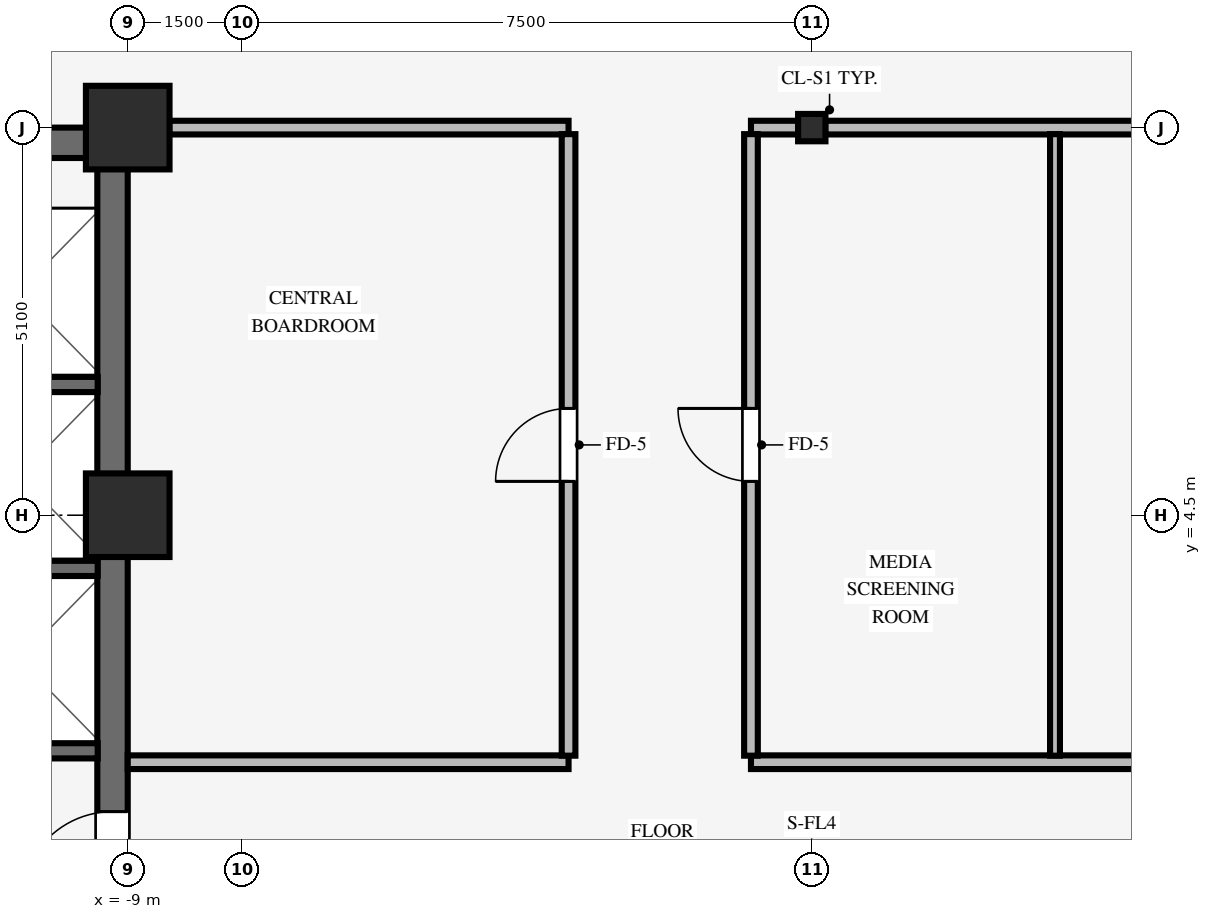
"""IFC4 building model, lengths in metres.
Left out: names, types, materials, properties, quantities, classifications, styles, units other than length and angle.
Written with IfcOpenShell. Run it as: python <this file> out.ifc"""

import sys

from ifc_helpers import new_model, si_unit, direction, frame, frame_2d, origin, origin_2d, place, context, subcontext, project, spatial, rectangle, i_section, extrude, source, transform, mapped, element, fill, save


model = new_model("IFC4")
c1 = context("Model", 3, precision=1e-05, world=origin(), true_north=direction((0.0, 1.0)))
c2 = subcontext(c1, "Body", "Model", "MODEL_VIEW")
j1 = project(units=[si_unit("LENGTHUNIT", "METRE"), si_unit("PLANEANGLEUNIT", "RADIAN")], contexts=[c1])
p1 = place(None, origin())
s1 = spatial("IfcSite", under=j1, at=p1, CompositionType="ELEMENT")
p2 = place(p1, origin())
s2 = spatial("IfcBuilding", under=s1, at=p2, CompositionType="ELEMENT")
p3 = place(p2, frame((0.0, 0.0, 112.9)))
s3 = spatial("IfcBuildingStorey", under=s2, at=p3, CompositionType="ELEMENT", Elevation=112.9)
p4 = place(p3, frame((-17.5, 9.4, 0.0), z_axis=(0.0, 0.0, 1.0), x_axis=(1.0, 0.0, 0.0)))
e1 = element("IfcWall", 1, at=p4, inside=s3, PredefinedType="SHEAR", context=c2, shape_type="SweptSolid", body=[
    extrude(rectangle(XDim=8.5, YDim=0.4, at=frame_2d((4.25, 0.0))), origin(), (0.0, 0.0, 1.0), 3.25),
])
p5 = place(p3, frame((-9.2, -9.205, 0.0), z_axis=(0.0, 0.0, 1.0), x_axis=(0.0, 1.0, 0.0)))
e2 = element("IfcWall", 2, at=p5, inside=s3, PredefinedType="SHEAR", context=c2, shape_type="SweptSolid", body=[
    extrude(rectangle(XDim=18.41, YDim=0.4, at=frame_2d((9.205, 0.0))), origin(), (0.0, 0.0, 1.0), 3.25),
])
p6 = place(p5, frame((8.605, 0.0, 0.0)))
e3 = element("IfcOpeningElement", 3, at=p6, cuts=e2, PredefinedType="OPENING", context=c2, shape_type="SweptSolid", body=[
    extrude(rectangle(XDim=1.2, YDim=2.15, at=frame_2d((0.6, 1.075))), frame((0.0, 0.21, 0.0), z_axis=(0.0, -1.0, 0.0), x_axis=(1.0, 0.0, 0.0)), (0.0, 0.0, 1.0), 0.42),
])
for number, where, z_axis, x_axis in (
    (4, (-9.0, 4.5, 0.0), (0.0, 0.0, 1.0), (1.0, 0.0, 0.0)),
    (5, (-9.0, 9.6, 0.0), (0.0, 0.0, 1.0), (1.0, 0.0, 0.0)),
):
    element("IfcColumn", number, at=place(p3, frame(where, z_axis=z_axis, x_axis=x_axis)), inside=s3, PredefinedType="COLUMN", context=c2, shape_type="SweptSolid", body=[
        extrude(rectangle(XDim=1.1, YDim=1.1, at=origin_2d()), origin(), (0.0, 0.0, 1.0), 3.25),
    ])
p7 = place(p3, frame((0.0, 9.6, 0.0), z_axis=(0.0, 0.0, 1.0), x_axis=(1.0, 0.0, 0.0)))
e6 = element("IfcColumn", 6, at=p7, inside=s3, PredefinedType="COLUMN", context=c2, shape_type="SweptSolid", body=[
    extrude(i_section(OverallWidth=0.36, OverallDepth=0.36, WebThickness=0.021, FlangeThickness=0.021, FilletRadius=0.018, at=origin_2d()), origin(), (0.0, 0.0, 1.0), 3.25),
])
for number, where, z_axis, x_axis in (
    (7, (-11.505, 1.4, 0.0), (0.0, 0.0, 1.0), (1.0, 0.0, 0.0)),
    (8, (-11.505, 3.8, 0.0), (0.0, 0.0, 1.0), (1.0, 0.0, 0.0)),
    (9, (-11.505, 6.22, 0.0), (0.0, 0.0, 1.0), (1.0, 0.0, 0.0)),
):
    element("IfcWall", number, at=place(p3, frame(where, z_axis=z_axis, x_axis=x_axis)), inside=s3, PredefinedType="SHEAR", context=c2, shape_type="SweptSolid", body=[
        extrude(rectangle(XDim=2.11, YDim=0.2, at=frame_2d((1.055, 0.0))), origin(), (0.0, 0.0, 1.0), 3.25),
    ])
p8 = place(p3, frame((-9.0, 1.25, 0.0), z_axis=(0.0, 0.0, 1.0), x_axis=(1.0, 0.0, 0.0)))
e10 = element("IfcWall", 10, at=p8, inside=s3, PredefinedType="PARTITIONING", context=c2, shape_type="SweptSolid", body=[
    extrude(rectangle(XDim=5.8, YDim=0.18, at=frame_2d((2.9, 0.0))), origin(), (0.0, 0.0, 1.0), 3.24),
])
p9 = place(p3, frame((-0.8, 1.25, 0.0), z_axis=(0.0, 0.0, 1.0), x_axis=(1.0, 0.0, 0.0)))
e11 = element("IfcWall", 11, at=p9, inside=s3, PredefinedType="PARTITIONING", context=c2, shape_type="SweptSolid", body=[
    extrude(rectangle(XDim=9.8, YDim=0.18, at=frame_2d((4.9, 0.0))), origin(), (0.0, 0.0, 1.0), 3.24),
])
p10 = place(p9, frame((6.42, 0.0, 0.0)))
e12 = element("IfcOpeningElement", 12, at=p10, cuts=e11, PredefinedType="OPENING", context=c2, shape_type="SweptSolid", body=[
    extrude(rectangle(XDim=0.96, YDim=2.1, at=frame_2d((0.48, 1.05))), frame((0.0, 0.1, 0.0), z_axis=(0.0, -1.0, 0.0), x_axis=(1.0, 0.0, 0.0)), (0.0, 0.0, 1.0), 0.2),
])
p11 = place(p3, frame((-8.454, 9.6, 0.0), z_axis=(0.0, 0.0, 1.0), x_axis=(1.0, 0.0, 0.0)))
e13 = element("IfcWall", 13, at=p11, inside=s3, PredefinedType="PARTITIONING", context=c2, shape_type="SweptSolid", body=[
    extrude(rectangle(XDim=5.254, YDim=0.18, at=frame_2d((2.627, 0.0))), origin(), (0.0, 0.0, 1.0), 2.285),
])
p12 = place(p3, frame((-0.8, 9.6, 0.0), z_axis=(0.0, 0.0, 1.0), x_axis=(1.0, 0.0, 0.0)))
e14 = element("IfcWall", 14, at=p12, inside=s3, PredefinedType="PARTITIONING", context=c2, shape_type="SweptSolid", body=[
    extrude(rectangle(XDim=0.624, YDim=0.18, at=frame_2d((0.312, 0.0))), origin(), (0.0, 0.0, 1.0), 2.285),
])
p13 = place(p3, frame((0.176, 9.6, 0.0), z_axis=(0.0, 0.0, 1.0), x_axis=(1.0, 0.0, 0.0)))
e15 = element("IfcWall", 15, at=p13, inside=s3, PredefinedType="PARTITIONING", context=c2, shape_type="SweptSolid", body=[
    extrude(rectangle(XDim=8.278, YDim=0.18, at=frame_2d((4.139, 0.0))), origin(), (0.0, 0.0, 1.0), 2.285),
])
p14 = place(p3, frame((-3.2, 1.336, 0.0), z_axis=(0.0, 0.0, 1.0), x_axis=(0.0, 1.0, 0.0)))
e16 = element("IfcWall", 16, at=p14, inside=s3, PredefinedType="PARTITIONING", context=c2, shape_type="SweptSolid", body=[
    extrude(rectangle(XDim=8.178, YDim=0.18, at=frame_2d((4.089, 0.0))), origin(), (0.0, 0.0, 1.0), 3.24),
])
p15 = place(p14, frame((3.609, 0.0, 0.0)))
e17 = element("IfcOpeningElement", 17, at=p15, cuts=e16, PredefinedType="OPENING", context=c2, shape_type="SweptSolid", body=[
    extrude(rectangle(XDim=0.96, YDim=2.1, at=frame_2d((0.48, 1.05))), frame((0.0, 0.1, 0.0), z_axis=(0.0, -1.0, 0.0), x_axis=(1.0, 0.0, 0.0)), (0.0, 0.0, 1.0), 0.2),
])
p16 = place(p3, frame((-0.8, 1.336, 0.0), z_axis=(0.0, 0.0, 1.0), x_axis=(0.0, 1.0, 0.0)))
e18 = element("IfcWall", 18, at=p16, inside=s3, PredefinedType="PARTITIONING", context=c2, shape_type="SweptSolid", body=[
    extrude(rectangle(XDim=8.178, YDim=0.18, at=frame_2d((4.089, 0.0))), origin(), (0.0, 0.0, 1.0), 3.24),
])
p17 = place(p16, frame((3.609, 0.0, 0.0)))
e19 = element("IfcOpeningElement", 19, at=p17, cuts=e18, PredefinedType="OPENING", context=c2, shape_type="SweptSolid", body=[
    extrude(rectangle(XDim=0.96, YDim=2.1, at=frame_2d((0.48, 1.05))), frame((0.0, 0.1, 0.0), z_axis=(0.0, -1.0, 0.0), x_axis=(1.0, 0.0, 0.0)), (0.0, 0.0, 1.0), 0.2),
])
p18 = place(p3, frame((3.2, 1.336, 0.0), z_axis=(0.0, 0.0, 1.0), x_axis=(0.0, 1.0, 0.0)))
e20 = element("IfcWall", 20, at=p18, inside=s3, PredefinedType="PARTITIONING", context=c2, shape_type="SweptSolid", body=[
    extrude(rectangle(XDim=8.178, YDim=0.13, at=frame_2d((4.089, 0.0))), origin(), (0.0, 0.0, 1.0), 3.24),
])
m1 = source(origin(), c2, "Body", "SweptSolid", [
    extrude(rectangle(XDim=1.2, YDim=2.15, at=frame_2d((0.6, 1.075))), frame((0.0, 0.025, 0.0), z_axis=(0.0, -1.0, 0.0), x_axis=(1.0, 0.0, 0.0)), (0.0, 0.0, 1.0), 0.05),
])
p19 = place(p6, origin())
e21 = element("IfcDoor", 21, at=p19, inside=s3, OperationType="SINGLE_SWING_LEFT", PredefinedType="DOOR", context=c2, shape_type="MappedRepresentation", body=[
    mapped(m1, transform((0.0, 0.0, 0.0), scale=1.0)),
])
fill(e3, e21)
m2 = source(origin(), c2, "Body", "SweptSolid", [
    extrude(rectangle(XDim=0.96, YDim=2.1, at=frame_2d((0.48, 1.05))), frame((0.0, 0.025, 0.0), z_axis=(0.0, -1.0, 0.0), x_axis=(1.0, 0.0, 0.0)), (0.0, 0.0, 1.0), 0.05),
])
p20 = place(p15, origin())
e22 = element("IfcDoor", 22, at=p20, inside=s3, OperationType="SINGLE_SWING_LEFT", PredefinedType="DOOR", context=c2, shape_type="MappedRepresentation", body=[
    mapped(m2, transform((0.0, 0.0, 0.0), scale=1.0)),
])
fill(e17, e22)
p21 = place(p17, origin())
e23 = element("IfcDoor", 23, at=p21, inside=s3, OperationType="SINGLE_SWING_RIGHT", PredefinedType="DOOR", context=c2, shape_type="MappedRepresentation", body=[
    mapped(m2, transform((0.0, 0.0, 0.0), scale=1.0)),
])
fill(e19, e23)
save(model, sys.argv[1])
